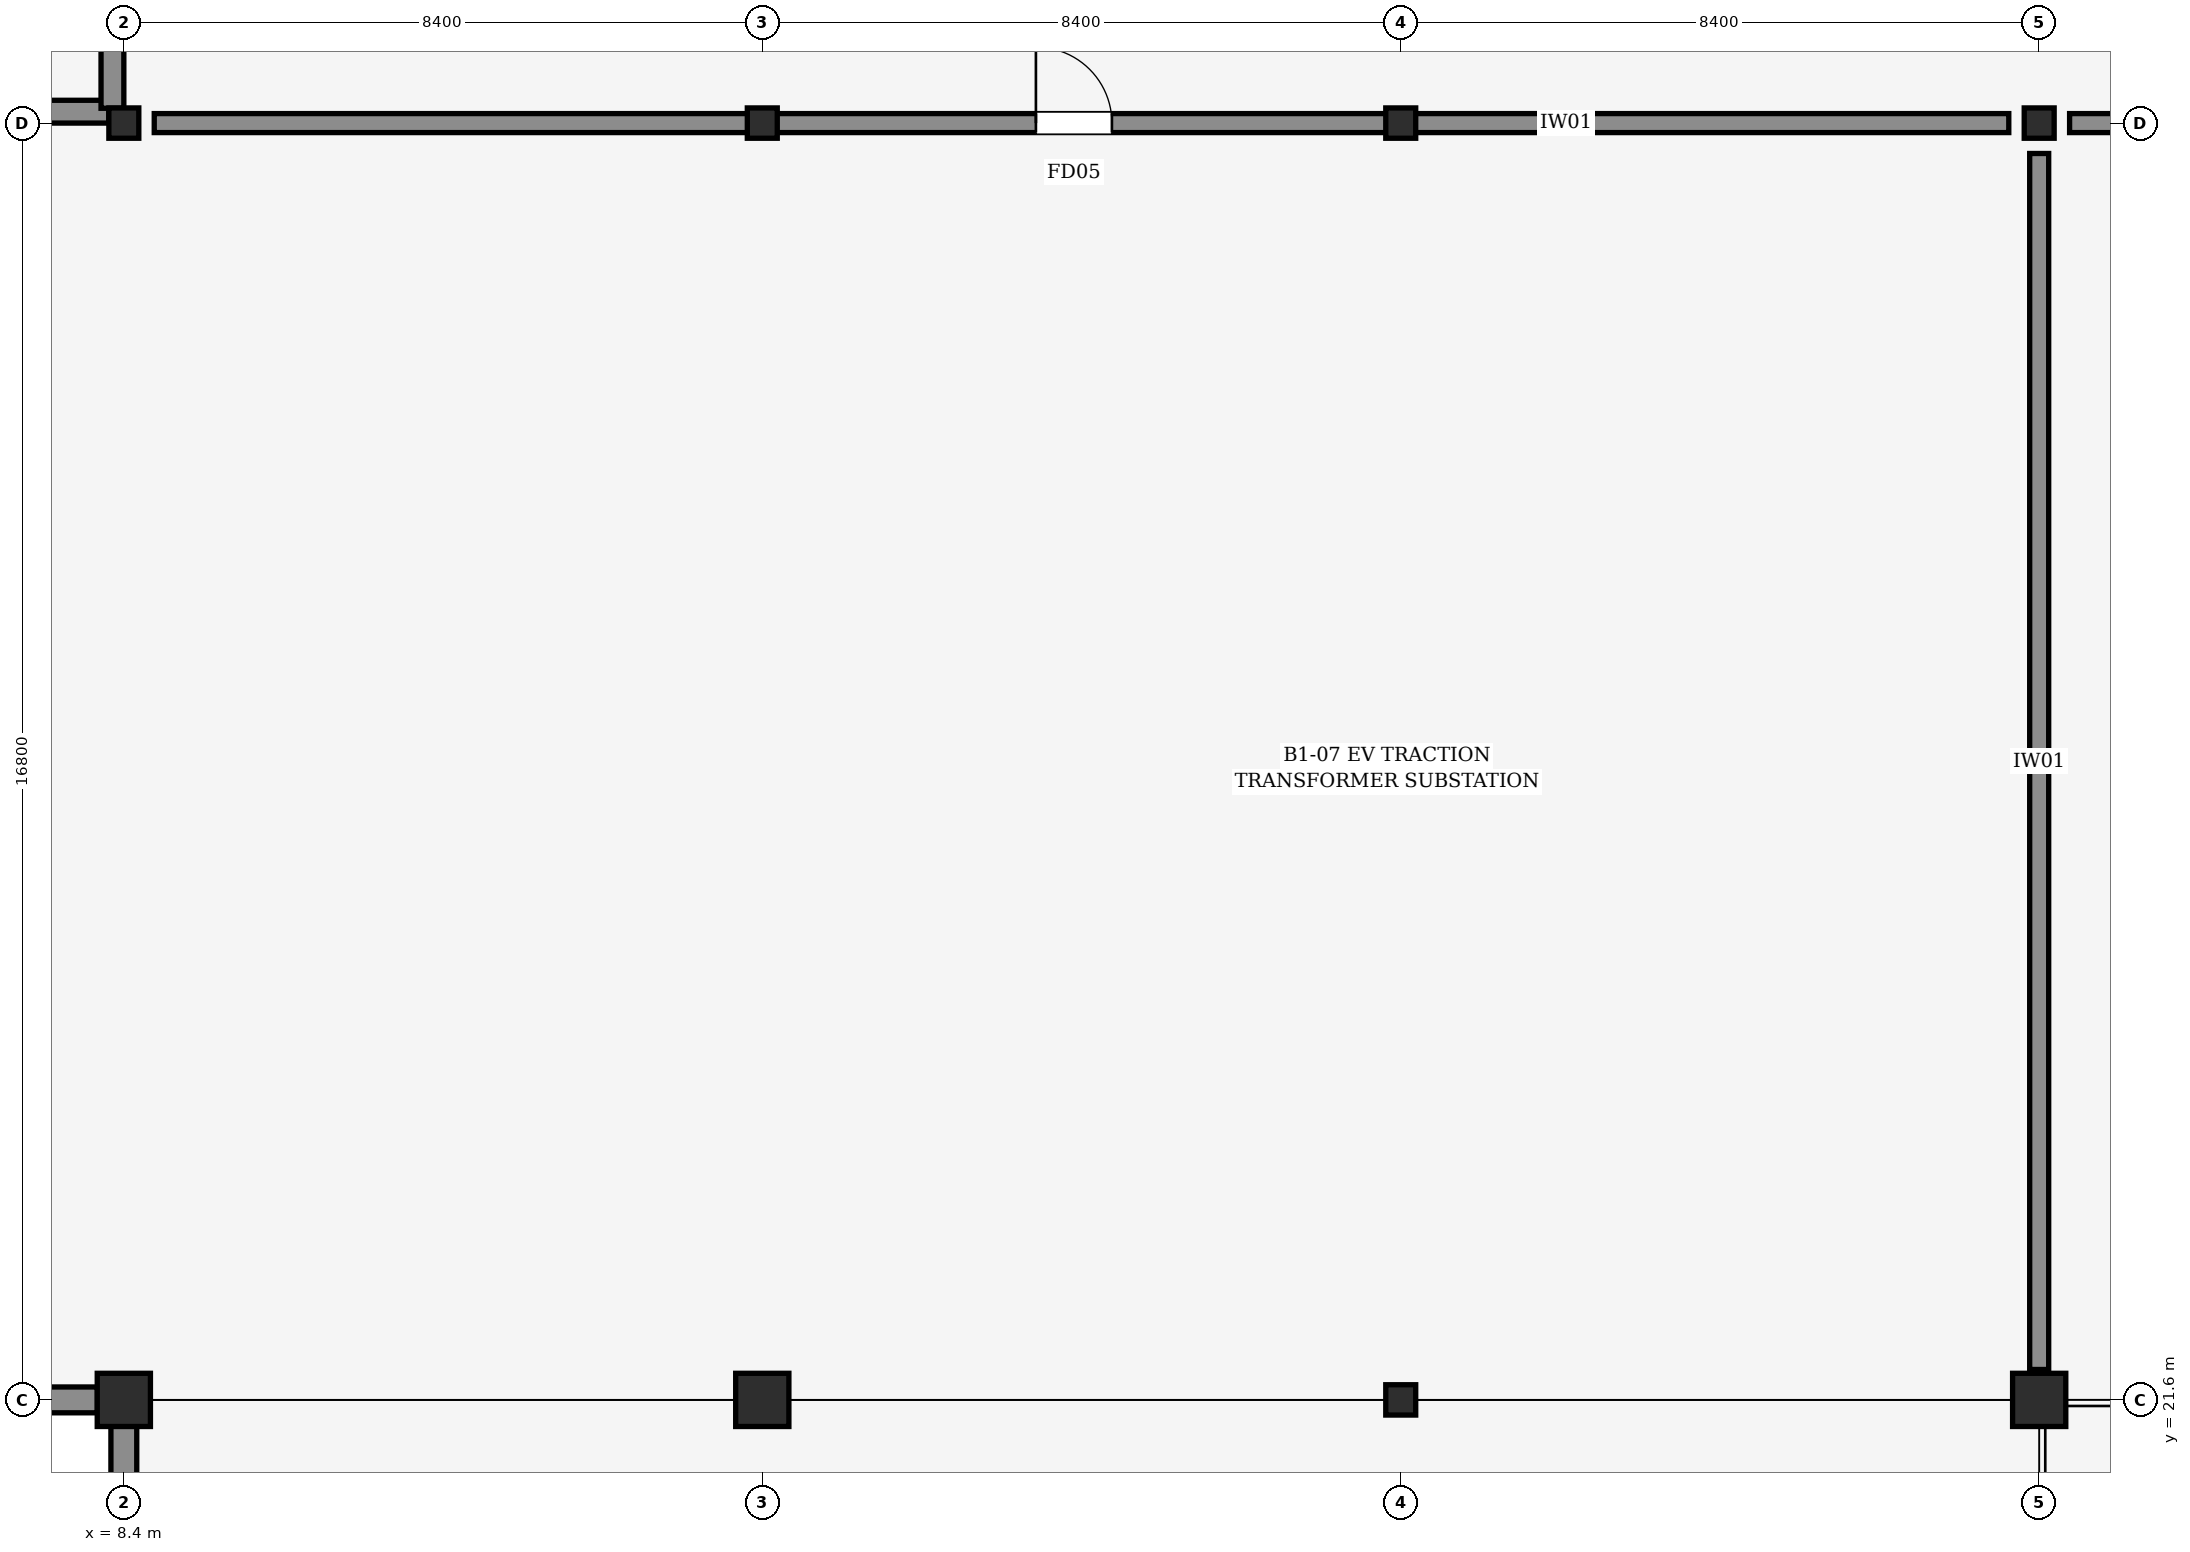
"""IFC4 building model, lengths in metres.
Left out: names, types, materials, properties, quantities, classifications, styles, units other than length and angle.
Written with IfcOpenShell. Run it as: python <this file> out.ifc"""

import sys

from ifc_helpers import new_model, si_unit, direction, frame, frame_2d, origin, origin_2d, place, context, subcontext, project, spatial, rectangle, i_section, extrude, element, fill, save


model = new_model("IFC4")
c1 = context("Model", 3, precision=1e-05, world=origin(), true_north=direction((0.0, 1.0)))
c2 = subcontext(c1, "Body", "Model", "MODEL_VIEW")
j1 = project(units=[si_unit("LENGTHUNIT", "METRE"), si_unit("PLANEANGLEUNIT", "RADIAN")], contexts=[c1])
p1 = place(None, origin())
s1 = spatial("IfcSite", under=j1, at=p1, CompositionType="ELEMENT")
p2 = place(p1, origin())
s2 = spatial("IfcBuilding", under=s1, at=p2, CompositionType="ELEMENT")
p3 = place(p2, frame((0.0, 0.0, -5.4)))
s3 = spatial("IfcBuildingStorey", under=s2, at=p3, CompositionType="ELEMENT", Elevation=-5.4)
p4 = place(p3, frame((8.4, 21.6, 0.0), z_axis=(0.0, 0.0, 1.0), x_axis=(1.0, 0.0, 0.0)))
e1 = element("IfcColumn", 1, at=p4, inside=s3, PredefinedType="COLUMN", context=c2, shape_type="SweptSolid", body=[
    extrude(rectangle(XDim=0.7, YDim=0.7, at=origin_2d()), origin(), (0.0, 0.0, 1.0), 5.4),
])
p5 = place(p3, frame((8.4, 38.4, 0.0), z_axis=(0.0, 0.0, 1.0), x_axis=(1.0, 0.0, 0.0)))
e2 = element("IfcColumn", 2, at=p5, inside=s3, PredefinedType="COLUMN", context=c2, shape_type="SweptSolid", body=[
    extrude(i_section(OverallWidth=0.399, OverallDepth=0.394, WebThickness=0.023, FlangeThickness=0.037, FilletRadius=0.015, at=origin_2d()), origin(), (0.0, 0.0, 1.0), 5.4),
])
p6 = place(p3, frame((16.8, 21.6, 0.0), z_axis=(0.0, 0.0, 1.0), x_axis=(1.0, 0.0, 0.0)))
e3 = element("IfcColumn", 3, at=p6, inside=s3, PredefinedType="COLUMN", context=c2, shape_type="SweptSolid", body=[
    extrude(rectangle(XDim=0.7, YDim=0.7, at=origin_2d()), origin(), (0.0, 0.0, 1.0), 5.4),
])
for number, where, z_axis, x_axis in (
    (4, (16.8, 38.4, 0.0), (0.0, 0.0, 1.0), (1.0, 0.0, 0.0)),
    (5, (25.2, 21.6, 0.0), (0.0, 0.0, 1.0), (1.0, 0.0, 0.0)),
    (6, (25.2, 38.4, 0.0), (0.0, 0.0, 1.0), (1.0, 0.0, 0.0)),
):
    element("IfcColumn", number, at=place(p3, frame(where, z_axis=z_axis, x_axis=x_axis)), inside=s3, PredefinedType="COLUMN", context=c2, shape_type="SweptSolid", body=[
        extrude(i_section(OverallWidth=0.399, OverallDepth=0.394, WebThickness=0.023, FlangeThickness=0.037, FilletRadius=0.015, at=origin_2d()), origin(), (0.0, 0.0, 1.0), 5.4),
    ])
p7 = place(p3, frame((33.6, 21.6, 0.0), z_axis=(0.0, 0.0, 1.0), x_axis=(1.0, 0.0, 0.0)))
e7 = element("IfcColumn", 7, at=p7, inside=s3, PredefinedType="COLUMN", context=c2, shape_type="SweptSolid", body=[
    extrude(rectangle(XDim=0.7, YDim=0.7, at=origin_2d()), origin(), (0.0, 0.0, 1.0), 5.4),
])
p8 = place(p3, frame((33.6, 38.4, 0.0), z_axis=(0.0, 0.0, 1.0), x_axis=(1.0, 0.0, 0.0)))
e8 = element("IfcColumn", 8, at=p8, inside=s3, PredefinedType="COLUMN", context=c2, shape_type="SweptSolid", body=[
    extrude(i_section(OverallWidth=0.399, OverallDepth=0.394, WebThickness=0.023, FlangeThickness=0.037, FilletRadius=0.015, at=origin_2d()), origin(), (0.0, 0.0, 1.0), 5.4),
])
p9 = place(p3, frame((0.198, 21.6, 0.0), z_axis=(0.0, 0.0, 1.0), x_axis=(1.0, 0.0, 0.0)))
e9 = element("IfcWall", 9, at=p9, inside=s3, PredefinedType="USERDEFINED", context=c2, shape_type="SweptSolid", body=[
    extrude(rectangle(XDim=7.854, YDim=0.34, at=frame_2d((3.927, 0.0))), origin(), (0.0, 0.0, 1.0), 4.06),
])
p10 = place(p3, frame((8.4, 11.148, 0.0), z_axis=(0.0, 0.0, 1.0), x_axis=(0.0, 1.0, 0.0)))
e10 = element("IfcWall", 10, at=p10, inside=s3, PredefinedType="USERDEFINED", context=c2, shape_type="SweptSolid", body=[
    extrude(rectangle(XDim=10.104, YDim=0.34, at=frame_2d((5.052, 0.0))), origin(), (0.0, 0.0, 1.0), 4.06),
])
p11 = place(p3, frame((0.198, 38.55, 0.0), z_axis=(0.0, 0.0, 1.0), x_axis=(1.0, 0.0, 0.0)))
e11 = element("IfcWall", 11, at=p11, inside=s3, PredefinedType="SHEAR", context=c2, shape_type="SweptSolid", body=[
    extrude(rectangle(XDim=8.005, YDim=0.3, at=frame_2d((4.002, 0.0))), origin(), (0.0, 0.0, 1.0), 5.12),
])
p12 = place(p3, frame((8.25, 38.595, 0.0), z_axis=(0.0, 0.0, 1.0), x_axis=(0.0, 1.0, 0.0)))
e12 = element("IfcWall", 12, at=p12, inside=s3, PredefinedType="SHEAR", context=c2, shape_type="SweptSolid", body=[
    extrude(rectangle(XDim=16.41, YDim=0.3, at=frame_2d((8.205, 0.0))), origin(), (0.0, 0.0, 1.0), 5.12),
])
p13 = place(p12, frame((5.655, 0.0, 0.0)))
e13 = element("IfcOpeningElement", 13, at=p13, cuts=e12, PredefinedType="OPENING", context=c2, shape_type="SweptSolid", body=[
    extrude(rectangle(XDim=1.3, YDim=2.2, at=frame_2d((0.65, 1.1))), frame((0.0, 0.16, 0.0), z_axis=(0.0, -1.0, 0.0), x_axis=(1.0, 0.0, 0.0)), (0.0, 0.0, 1.0), 0.32),
])
p14 = place(p3, frame((8.8, 38.4, 0.0), z_axis=(0.0, 0.0, 1.0), x_axis=(1.0, 0.0, 0.0)))
e14 = element("IfcWall", 14, at=p14, inside=s3, PredefinedType="PARTITIONING", context=c2, shape_type="SweptSolid", body=[
    extrude(rectangle(XDim=24.4, YDim=0.25, at=frame_2d((12.2, 0.0))), origin(), (0.0, 0.0, 1.0), 4.025),
])
p15 = place(p14, frame((11.6, 0.0, 0.0)))
e15 = element("IfcOpeningElement", 15, at=p15, cuts=e14, PredefinedType="OPENING", context=c2, shape_type="SweptSolid", body=[
    extrude(rectangle(XDim=1.0, YDim=2.15, at=frame_2d((0.5, 1.075))), frame((0.0, 0.135, 0.0), z_axis=(0.0, -1.0, 0.0), x_axis=(1.0, 0.0, 0.0)), (0.0, 0.0, 1.0), 0.27),
])
p16 = place(p3, frame((34.0, 38.4, 0.0), z_axis=(0.0, 0.0, 1.0), x_axis=(1.0, 0.0, 0.0)))
e16 = element("IfcWall", 16, at=p16, inside=s3, PredefinedType="PARTITIONING", context=c2, shape_type="SweptSolid", body=[
    extrude(rectangle(XDim=24.4, YDim=0.25, at=frame_2d((12.2, 0.0))), origin(), (0.0, 0.0, 1.0), 4.025),
])
p17 = place(p16, frame((11.6, 0.0, 0.0)))
e17 = element("IfcOpeningElement", 17, at=p17, cuts=e16, PredefinedType="OPENING", context=c2, shape_type="SweptSolid", body=[
    extrude(rectangle(XDim=1.0, YDim=2.15, at=frame_2d((0.5, 1.075))), frame((0.0, 0.135, 0.0), z_axis=(0.0, -1.0, 0.0), x_axis=(1.0, 0.0, 0.0)), (0.0, 0.0, 1.0), 0.27),
])
p18 = place(p3, frame((33.6, 22.0, 0.0), z_axis=(0.0, 0.0, 1.0), x_axis=(0.0, 1.0, 0.0)))
e18 = element("IfcWall", 18, at=p18, inside=s3, PredefinedType="PARTITIONING", context=c2, shape_type="SweptSolid", body=[
    extrude(rectangle(XDim=16.0, YDim=0.25, at=frame_2d((8.0, 0.0))), origin(), (0.0, 0.0, 1.0), 4.025),
])
p19 = place(p15, origin())
e19 = element("IfcDoor", 19, at=p19, inside=s3, OperationType="SINGLE_SWING_LEFT", PredefinedType="DOOR", context=c2, shape_type="SweptSolid", body=[
    extrude(rectangle(XDim=1.0, YDim=2.15, at=frame_2d((0.5, 1.075))), frame((0.0, 0.025, 0.0), z_axis=(0.0, -1.0, 0.0), x_axis=(1.0, 0.0, 0.0)), (0.0, 0.0, 1.0), 0.05),
])
fill(e15, e19)
save(model, sys.argv[1])
